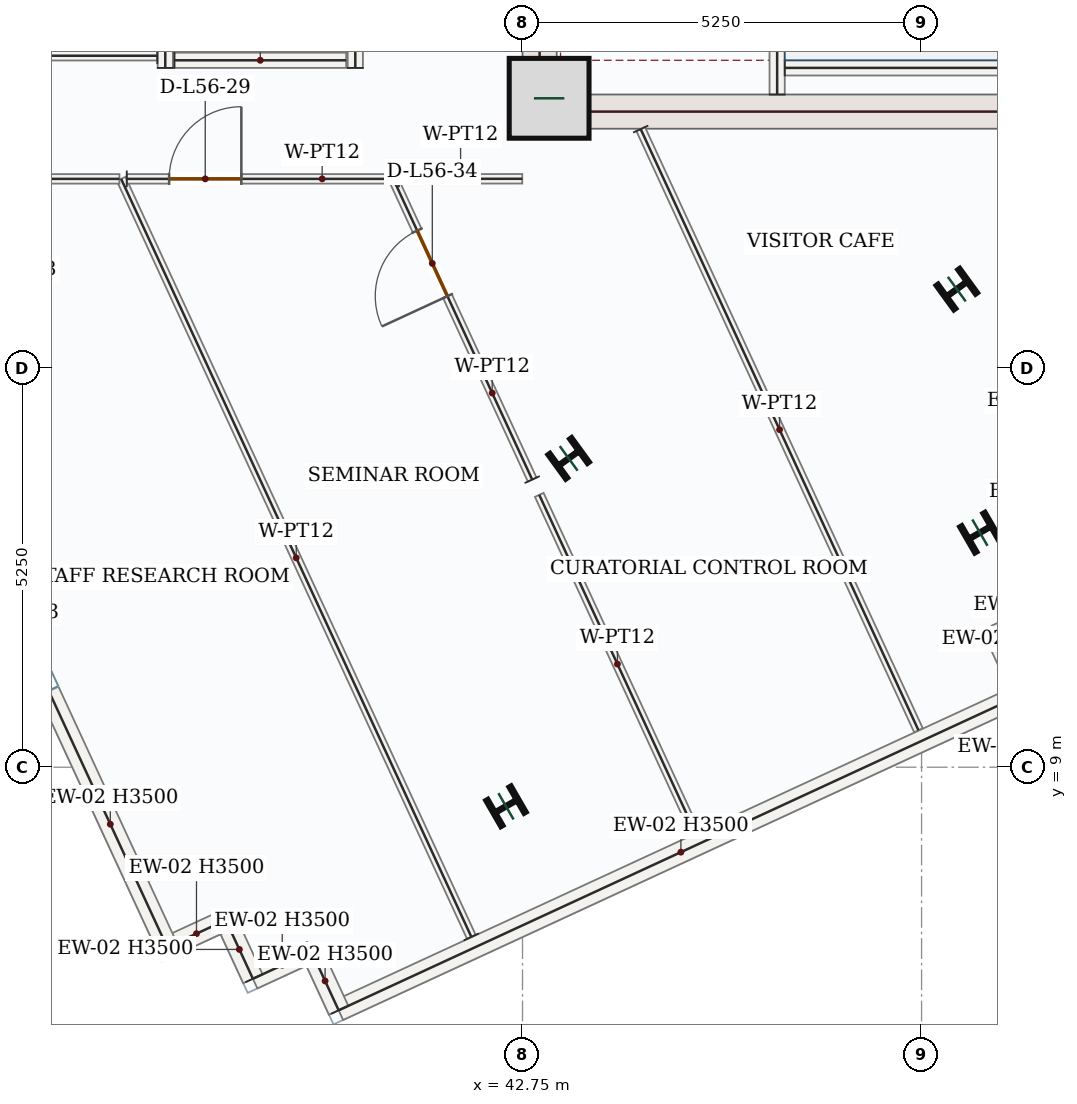
"""IFC4 building model, lengths in metres.
Left out: names, types, materials, properties, quantities, classifications, styles, units other than length and angle.
Written with IfcOpenShell. Run it as: python <this file> out.ifc"""

import sys

from ifc_helpers import new_model, si_unit, direction, frame, frame_2d, origin, origin_2d, place, context, subcontext, project, spatial, rectangle, i_section, extrude, source, transform, mapped, element, fill, save


model = new_model("IFC4")
c1 = context("Model", 3, precision=1e-05, world=origin(), true_north=direction((0.0, 1.0)))
c2 = subcontext(c1, "Body", "Model", "MODEL_VIEW")
j1 = project(units=[si_unit("LENGTHUNIT", "METRE"), si_unit("PLANEANGLEUNIT", "RADIAN")], contexts=[c1])
p1 = place(None, origin())
s1 = spatial("IfcSite", under=j1, at=p1, CompositionType="ELEMENT")
p2 = place(p1, origin())
s2 = spatial("IfcBuilding", under=s1, at=p2, CompositionType="ELEMENT")
p3 = place(p2, frame((0.0, 0.0, 239.1)))
s3 = spatial("IfcBuildingStorey", under=s2, at=p3, CompositionType="ELEMENT", Elevation=239.1)
p4 = place(p3, frame((42.975, 17.4, 0.0), z_axis=(0.0, 0.0, 1.0), x_axis=(0.0, 1.0, 0.0)))
e1 = element("IfcWall", 1, at=p4, inside=s3, PredefinedType="SHEAR", context=c2, shape_type="SweptSolid", body=[
    extrude(rectangle(XDim=8.55, YDim=0.45, at=frame_2d((4.275, 0.0))), origin(), (0.0, 0.0, 1.0), 3.5),
])
p5 = place(p4, frame((6.65, 0.0, 0.0)))
e2 = element("IfcOpeningElement", 2, at=p5, cuts=e1, PredefinedType="OPENING", context=c2, shape_type="SweptSolid", body=[
    extrude(rectangle(XDim=1.1, YDim=2.2, at=frame_2d((0.55, 1.1))), frame((0.0, 0.235, 0.0), z_axis=(0.0, -1.0, 0.0), x_axis=(1.0, 0.0, 0.0)), (0.0, 0.0, 1.0), 0.47),
])
p6 = place(p4, frame((1.75, 0.0, 0.0)))
e3 = element("IfcOpeningElement", 3, at=p6, cuts=e1, PredefinedType="OPENING", context=c2, shape_type="SweptSolid", body=[
    extrude(rectangle(XDim=1.3, YDim=2.2, at=frame_2d((0.65, 1.1))), frame((0.0, 0.235, 0.0), z_axis=(0.0, -1.0, 0.0), x_axis=(1.0, 0.0, 0.0)), (0.0, 0.0, 1.0), 0.47),
])
p7 = place(p4, frame((4.3, 0.0, 0.0)))
e4 = element("IfcOpeningElement", 4, at=p7, cuts=e1, PredefinedType="OPENING", context=c2, shape_type="SweptSolid", body=[
    extrude(rectangle(XDim=0.88, YDim=2.1, at=frame_2d((0.44, 1.05))), frame((0.0, 0.235, 0.0), z_axis=(0.0, -1.0, 0.0), x_axis=(1.0, 0.0, 0.0)), (0.0, 0.0, 1.0), 0.47),
])
m1 = source(origin(), c2, "Body", "SweptSolid", [
    extrude(rectangle(XDim=7.1, YDim=0.45, at=frame_2d((3.55, 0.0))), origin(), (0.0, 0.0, 1.0), 3.5),
])
p8 = place(p3, frame((43.2, 17.625, 0.0), z_axis=(0.0, 0.0, 1.0), x_axis=(1.0, 0.0, 0.0)))
e5 = element("IfcWall", 5, at=p8, inside=s3, PredefinedType="SHEAR", context=c2, shape_type="MappedRepresentation", body=[
    mapped(m1, transform((0.0, 0.0, 0.0), x_axis=(1.0, 0.0, 0.0), y_axis=(0.0, 1.0, 0.0), z_axis=(0.0, 0.0, 1.0), scale=1.0)),
])
m2 = source(origin(), c2, "Body", "SweptSolid", [
    extrude(rectangle(XDim=1.05, YDim=1.05, at=origin_2d()), origin(), (0.0, 0.0, 1.0), 3.75),
])
p9 = place(p3, frame((43.1, 17.8, 0.0), z_axis=(0.0, 0.0, 1.0), x_axis=(1.0, 0.0, 0.0)))
e6 = element("IfcColumn", 6, at=p9, inside=s3, PredefinedType="COLUMN", context=c2, shape_type="MappedRepresentation", body=[
    mapped(m2, transform((0.0, 0.0, 0.0), x_axis=(1.0, 0.0, 0.0), y_axis=(0.0, 1.0, 0.0), z_axis=(0.0, 0.0, 1.0), scale=1.0)),
])
m3 = source(origin(), c2, "Body", "SweptSolid", [
    extrude(i_section(OverallWidth=0.399, OverallDepth=0.386, WebThickness=0.021, FlangeThickness=0.033, FilletRadius=0.018, at=origin_2d()), origin(), (0.0, 0.0, 1.0), 3.75),
])
for number, where, z_axis, x_axis in (
    (7, (43.357, 13.063, 0.0), (0.0, 0.0, 1.0), (-0.588, 0.809, 0.0)),
    (8, (48.464, 15.289, 0.0), (0.0, 0.0, 1.0), (-0.588, 0.809, 0.0)),
    (9, (42.532, 8.486, 0.0), (0.0, 0.0, 1.0), (-0.5, 0.866, 0.0)),
    (10, (48.768, 12.086, 0.0), (0.0, 0.0, 1.0), (-0.5, 0.866, 0.0)),
):
    element("IfcColumn", number, at=place(p3, frame(where, z_axis=z_axis, x_axis=x_axis)), inside=s3, PredefinedType="COLUMN", context=c2, shape_type="MappedRepresentation", body=[
        mapped(m3, transform((0.0, 0.0, 0.0), x_axis=(1.0, 0.0, 0.0), y_axis=(0.0, 1.0, 0.0), z_axis=(0.0, 0.0, 1.0), scale=1.0)),
    ])
m4 = source(origin(), c2, "Body", "SweptSolid", [
    extrude(rectangle(XDim=0.85, YDim=0.28, at=frame_2d((0.425, 0.0))), origin(), (0.0, 0.0, 1.0), 3.5),
])
p10 = place(p3, frame((49.751, 11.091, 0.0), z_axis=(0.0, 0.0, 1.0), x_axis=(-0.907791150023, -0.419422493365, 0.0)))
e11 = element("IfcWall", 11, at=p10, inside=s3, PredefinedType="SOLIDWALL", context=c2, shape_type="MappedRepresentation", body=[
    mapped(m4, transform((0.0, 0.0, 0.0), x_axis=(1.0, 0.0, 0.0), y_axis=(0.0, 1.0, 0.0), z_axis=(0.0, 0.0, 1.0), scale=1.0)),
])
m5 = source(origin(), c2, "Body", "SweptSolid", [
    extrude(rectangle(XDim=0.85, YDim=0.28, at=frame_2d((0.425, 0.0))), origin(), (0.0, 0.0, 1.0), 3.5),
])
p11 = place(p3, frame((48.98, 10.734, 0.0), z_axis=(0.0, 0.0, 1.0), x_axis=(0.419313139191, -0.907841666427, 0.0)))
e12 = element("IfcWall", 12, at=p11, inside=s3, PredefinedType="SOLIDWALL", context=c2, shape_type="MappedRepresentation", body=[
    mapped(m5, transform((0.0, 0.0, 0.0), x_axis=(1.0, 0.0, 0.0), y_axis=(0.0, 1.0, 0.0), z_axis=(0.0, 0.0, 1.0), scale=1.0)),
])
m6 = source(origin(), c2, "Body", "SweptSolid", [
    extrude(rectangle(XDim=9.92, YDim=0.28, at=frame_2d((4.96, 0.0))), origin(), (0.0, 0.0, 1.0), 3.5),
])
p12 = place(p3, frame((49.336, 9.963, 0.0), z_axis=(0.0, 0.0, 1.0), x_axis=(-0.907779940536, -0.419446754143, 0.0)))
e13 = element("IfcWall", 13, at=p12, inside=s3, PredefinedType="SOLIDWALL", context=c2, shape_type="MappedRepresentation", body=[
    mapped(m6, transform((0.0, 0.0, 0.0), x_axis=(1.0, 0.0, 0.0), y_axis=(0.0, 1.0, 0.0), z_axis=(0.0, 0.0, 1.0), scale=1.0)),
])
p13 = place(p3, frame((40.331, 5.802, 0.0), z_axis=(0.0, 0.0, 1.0), x_axis=(-0.419422493365, 0.907791150023, 0.0)))
e14 = element("IfcWall", 14, at=p13, inside=s3, PredefinedType="SOLIDWALL", context=c2, shape_type="MappedRepresentation", body=[
    mapped(m4, transform((0.0, 0.0, 0.0), x_axis=(1.0, 0.0, 0.0), y_axis=(0.0, 1.0, 0.0), z_axis=(0.0, 0.0, 1.0), scale=1.0)),
])
p14 = place(p3, frame((39.975, 6.573, 0.0), z_axis=(0.0, 0.0, 1.0), x_axis=(-0.907841666427, -0.419313139191, 0.0)))
e15 = element("IfcWall", 15, at=p14, inside=s3, PredefinedType="SOLIDWALL", context=c2, shape_type="MappedRepresentation", body=[
    mapped(m5, transform((0.0, 0.0, 0.0), x_axis=(1.0, 0.0, 0.0), y_axis=(0.0, 1.0, 0.0), z_axis=(0.0, 0.0, 1.0), scale=1.0)),
])
p15 = place(p3, frame((39.203, 6.217, 0.0), z_axis=(0.0, 0.0, 1.0), x_axis=(-0.419422493365, 0.907791150023, 0.0)))
e16 = element("IfcWall", 16, at=p15, inside=s3, PredefinedType="SOLIDWALL", context=c2, shape_type="MappedRepresentation", body=[
    mapped(m4, transform((0.0, 0.0, 0.0), x_axis=(1.0, 0.0, 0.0), y_axis=(0.0, 1.0, 0.0), z_axis=(0.0, 0.0, 1.0), scale=1.0)),
])
p16 = place(p3, frame((38.846, 6.988, 0.0), z_axis=(0.0, 0.0, 1.0), x_axis=(-0.907841666427, -0.419313139191, 0.0)))
e17 = element("IfcWall", 17, at=p16, inside=s3, PredefinedType="SOLIDWALL", context=c2, shape_type="MappedRepresentation", body=[
    mapped(m5, transform((0.0, 0.0, 0.0), x_axis=(1.0, 0.0, 0.0), y_axis=(0.0, 1.0, 0.0), z_axis=(0.0, 0.0, 1.0), scale=1.0)),
])
p17 = place(p3, frame((38.075, 6.632, 0.0), z_axis=(0.0, 0.0, 1.0), x_axis=(-0.419437747849, 0.90778410191, 0.0)))
e18 = element("IfcWall", 18, at=p17, inside=s3, PredefinedType="SOLIDWALL", context=c2, shape_type="SweptSolid", body=[
    extrude(rectangle(XDim=8.932, YDim=0.28, at=frame_2d((4.466, 0.0))), origin(), (0.0, 0.0, 1.0), 3.5),
])
p18 = place(p17, frame((3.716, 0.0, 0.85)))
e19 = element("IfcOpeningElement", 19, at=p18, cuts=e18, PredefinedType="OPENING", context=c2, shape_type="SweptSolid", body=[
    extrude(rectangle(XDim=1.5, YDim=1.5, at=frame_2d((0.75, 0.75))), frame((0.0, 0.15, 0.0), z_axis=(0.0, -1.0, 0.0), x_axis=(1.0, 0.0, 0.0)), (0.0, 0.0, 1.0), 0.3),
])
p19 = place(p3, frame((46.1, 17.85, 0.0), z_axis=(0.0, 0.0, 1.0), x_axis=(0.0, 1.0, 0.0)))
e20 = element("IfcWall", 20, at=p19, inside=s3, PredefinedType="SOLIDWALL", context=c2, shape_type="SweptSolid", body=[
    extrude(rectangle(XDim=8.0, YDim=0.2, at=frame_2d((4.0, 0.0))), origin(), (0.0, 0.0, 1.0), 3.5),
])
p20 = place(p19, frame((6.3, 0.0, 0.0)))
e21 = element("IfcOpeningElement", 21, at=p20, cuts=e20, PredefinedType="OPENING", context=c2, shape_type="SweptSolid", body=[
    extrude(rectangle(XDim=1.05, YDim=2.15, at=frame_2d((0.525, 1.075))), frame((0.0, 0.11, 0.0), z_axis=(0.0, -1.0, 0.0), x_axis=(1.0, 0.0, 0.0)), (0.0, 0.0, 1.0), 0.22),
])
m7 = source(origin(), c2, "Body", "SweptSolid", [
    extrude(rectangle(XDim=3.25, YDim=0.2, at=frame_2d((1.625, 0.0))), origin(), (0.0, 0.0, 1.0), 3.5),
])
p21 = place(p3, frame((46.2, 18.2, 0.0), z_axis=(0.0, 0.0, 1.0), x_axis=(1.0, 0.0, 0.0)))
e22 = element("IfcWall", 22, at=p21, inside=s3, PredefinedType="SOLIDWALL", context=c2, shape_type="MappedRepresentation", body=[
    mapped(m7, transform((0.0, 0.0, 0.0), x_axis=(1.0, 0.0, 0.0), y_axis=(0.0, 1.0, 0.0), z_axis=(0.0, 0.0, 1.0), scale=1.0)),
])
m8 = source(origin(), c2, "Body", "SweptSolid", [
    extrude(rectangle(XDim=2.35, YDim=0.2, at=frame_2d((1.175, 0.0))), origin(), (0.0, 0.0, 1.0), 3.5),
])
for number, where, z_axis, x_axis in (
    (23, (38.05, 18.2, 0.0), (0.0, 0.0, 1.0), (0.0, 1.0, 0.0)),
    (24, (40.55, 18.2, 0.0), (0.0, 0.0, 1.0), (0.0, 1.0, 0.0)),
):
    element("IfcWall", number, at=place(p3, frame(where, z_axis=z_axis, x_axis=x_axis)), inside=s3, PredefinedType="SOLIDWALL", context=c2, shape_type="MappedRepresentation", body=[
        mapped(m8, transform((0.0, 0.0, 0.0), x_axis=(1.0, 0.0, 0.0), y_axis=(0.0, 1.0, 0.0), z_axis=(0.0, 0.0, 1.0), scale=1.0)),
    ])
m9 = source(origin(), c2, "Body", "SweptSolid", [
    extrude(rectangle(XDim=2.26, YDim=0.2, at=frame_2d((1.13, 0.0))), origin(), (0.0, 0.0, 1.0), 3.5),
])
p22 = place(p3, frame((38.17, 18.3, 0.0), z_axis=(0.0, 0.0, 1.0), x_axis=(1.0, 0.0, 0.0)))
e25 = element("IfcWall", 25, at=p22, inside=s3, PredefinedType="SOLIDWALL", context=c2, shape_type="MappedRepresentation", body=[
    mapped(m9, transform((0.0, 0.0, 0.0), x_axis=(1.0, 0.0, 0.0), y_axis=(0.0, 1.0, 0.0), z_axis=(0.0, 0.0, 1.0), scale=1.0)),
])
p23 = place(p3, frame((37.945, 18.36, 0.0), z_axis=(0.0, 0.0, 1.0), x_axis=(-1.0, 0.0, 0.0)))
e26 = element("IfcWall", 26, at=p23, inside=s3, PredefinedType="PARTITIONING", context=c2, shape_type="SweptSolid", body=[
    extrude(rectangle(XDim=3.89, YDim=0.125, at=frame_2d((1.945, 0.0))), origin(), (0.0, 0.0, 1.0), 3.5),
])
p24 = place(p23, frame((1.47, 0.0, 0.0)))
e27 = element("IfcOpeningElement", 27, at=p24, cuts=e26, PredefinedType="OPENING", context=c2, shape_type="SweptSolid", body=[
    extrude(rectangle(XDim=0.95, YDim=2.15, at=frame_2d((0.475, 1.075))), frame((0.0, 0.073, 0.0), z_axis=(0.0, -1.0, 0.0), x_axis=(1.0, 0.0, 0.0)), (0.0, 0.0, 1.0), 0.145),
])
m10 = source(origin(), c2, "Body", "SweptSolid", [
    extrude(rectangle(XDim=4.904, YDim=0.125, at=frame_2d((2.452, 0.0))), origin(), (0.0, 0.0, 1.0), 3.5),
])
p25 = place(p3, frame((45.027, 8.131, 0.0), z_axis=(0.0, 0.0, 1.0), x_axis=(-0.419459107568, 0.907774232438, 0.0)))
e28 = element("IfcWall", 28, at=p25, inside=s3, PredefinedType="PARTITIONING", context=c2, shape_type="MappedRepresentation", body=[
    mapped(m10, transform((0.0, 0.0, 0.0), x_axis=(1.0, 0.0, 0.0), y_axis=(0.0, 1.0, 0.0), z_axis=(0.0, 0.0, 1.0), scale=1.0)),
])
p26 = place(p3, frame((42.877, 12.784, 0.0), z_axis=(0.0, 0.0, 1.0), x_axis=(-0.419416941906, 0.907793714917, 0.0)))
e29 = element("IfcWall", 29, at=p26, inside=s3, PredefinedType="PARTITIONING", context=c2, shape_type="SweptSolid", body=[
    extrude(rectangle(XDim=4.358, YDim=0.125, at=frame_2d((2.179, 0.0))), origin(), (0.0, 0.0, 1.0), 3.5),
])
p27 = place(p26, frame((2.658, 0.0, 0.0)))
e30 = element("IfcOpeningElement", 30, at=p27, cuts=e29, PredefinedType="OPENING", context=c2, shape_type="SweptSolid", body=[
    extrude(rectangle(XDim=0.95, YDim=2.15, at=frame_2d((0.475, 1.075))), frame((0.0, 0.073, 0.0), z_axis=(0.0, -1.0, 0.0), x_axis=(1.0, 0.0, 0.0)), (0.0, 0.0, 1.0), 0.145),
])
m11 = source(origin(), c2, "Body", "SweptSolid", [
    extrude(rectangle(XDim=1.623, YDim=0.125, at=frame_2d((0.812, 0.0))), origin(), (0.0, 0.0, 1.0), 3.5),
])
p28 = place(p3, frame((41.124, 16.74, 0.0), z_axis=(0.0, 0.0, 1.0), x_axis=(0.999999717168, 0.000752105684, 0.0)))
e31 = element("IfcWall", 31, at=p28, inside=s3, PredefinedType="PARTITIONING", context=c2, shape_type="MappedRepresentation", body=[
    mapped(m11, transform((0.0, 0.0, 0.0), x_axis=(1.0, 0.0, 0.0), y_axis=(0.0, 1.0, 0.0), z_axis=(0.0, 0.0, 1.0), scale=1.0)),
])
m12 = source(origin(), c2, "Body", "SweptSolid", [
    extrude(rectangle(XDim=8.712, YDim=0.125, at=frame_2d((4.356, 0.0))), origin(), (0.0, 0.0, 1.0), 3.5),
])
p29 = place(p3, frame((44.305, 17.395, 0.0), z_axis=(0.0, 0.0, 1.0), x_axis=(0.419438424399, -0.907783789312, 0.0)))
e32 = element("IfcWall", 32, at=p29, inside=s3, PredefinedType="PARTITIONING", context=c2, shape_type="MappedRepresentation", body=[
    mapped(m12, transform((0.0, 0.0, 0.0), x_axis=(1.0, 0.0, 0.0), y_axis=(0.0, 1.0, 0.0), z_axis=(0.0, 0.0, 1.0), scale=1.0)),
])
m13 = source(origin(), c2, "Body", "SweptSolid", [
    extrude(rectangle(XDim=10.985, YDim=0.125, at=frame_2d((5.492, 0.0))), origin(), (0.0, 0.0, 1.0), 3.5),
])
p30 = place(p3, frame((42.077, 6.768, 0.0), z_axis=(0.0, 0.0, 1.0), x_axis=(-0.41945135704, 0.907777813717, 0.0)))
e33 = element("IfcWall", 33, at=p30, inside=s3, PredefinedType="PARTITIONING", context=c2, shape_type="MappedRepresentation", body=[
    mapped(m13, transform((0.0, 0.0, 0.0), x_axis=(1.0, 0.0, 0.0), y_axis=(0.0, 1.0, 0.0), z_axis=(0.0, 0.0, 1.0), scale=1.0)),
])
p31 = place(p3, frame((37.543, 16.74, 0.0), z_axis=(0.0, 0.0, 1.0), x_axis=(1.0, 0.0, 0.0)))
e34 = element("IfcWall", 34, at=p31, inside=s3, PredefinedType="PARTITIONING", context=c2, shape_type="SweptSolid", body=[
    extrude(rectangle(XDim=3.484, YDim=0.125, at=frame_2d((1.742, 0.0))), origin(), (0.0, 0.0, 1.0), 3.5),
])
p32 = place(p31, frame((0.557, 0.0, 0.0)))
e35 = element("IfcOpeningElement", 35, at=p32, cuts=e34, PredefinedType="OPENING", context=c2, shape_type="SweptSolid", body=[
    extrude(rectangle(XDim=0.95, YDim=2.15, at=frame_2d((0.475, 1.075))), frame((0.0, 0.073, 0.0), z_axis=(0.0, -1.0, 0.0), x_axis=(1.0, 0.0, 0.0)), (0.0, 0.0, 1.0), 0.145),
])
p33 = place(p3, frame((32.211, 16.74, 0.0), z_axis=(0.0, 0.0, 1.0), x_axis=(1.0, 0.0, 0.0)))
e36 = element("IfcWall", 36, at=p33, inside=s3, PredefinedType="PARTITIONING", context=c2, shape_type="SweptSolid", body=[
    extrude(rectangle(XDim=5.236, YDim=0.125, at=frame_2d((2.618, 0.0))), origin(), (0.0, 0.0, 1.0), 3.5),
])
p34 = place(p33, frame((3.343, 0.0, 0.0)))
e37 = element("IfcOpeningElement", 37, at=p34, cuts=e36, PredefinedType="OPENING", context=c2, shape_type="SweptSolid", body=[
    extrude(rectangle(XDim=0.95, YDim=2.15, at=frame_2d((0.475, 1.075))), frame((0.0, 0.073, 0.0), z_axis=(0.0, -1.0, 0.0), x_axis=(1.0, 0.0, 0.0)), (0.0, 0.0, 1.0), 0.145),
])
m14 = source(origin(), c2, "Body", "SweptSolid", [
    extrude(rectangle(XDim=0.95, YDim=2.15, at=frame_2d((0.475, 1.075))), frame((0.0, 0.025, 0.0), z_axis=(0.0, -1.0, 0.0), x_axis=(1.0, 0.0, 0.0)), (0.0, 0.0, 1.0), 0.05),
])
p35 = place(p32, origin())
e38 = element("IfcDoor", 38, at=p35, inside=s3, OperationType="SINGLE_SWING_RIGHT", PredefinedType="DOOR", context=c2, shape_type="MappedRepresentation", body=[
    mapped(m14, transform((0.0, 0.0, 0.0), x_axis=(1.0, 0.0, 0.0), y_axis=(0.0, 1.0, 0.0), z_axis=(0.0, 0.0, 1.0), scale=1.0)),
])
fill(e35, e38)
p36 = place(p27, origin())
e39 = element("IfcDoor", 39, at=p36, inside=s3, OperationType="SINGLE_SWING_LEFT", PredefinedType="DOOR", context=c2, shape_type="MappedRepresentation", body=[
    mapped(m14, transform((0.0, 0.0, 0.0), x_axis=(1.0, 0.0, 0.0), y_axis=(0.0, 1.0, 0.0), z_axis=(0.0, 0.0, 1.0), scale=1.0)),
])
fill(e30, e39)
save(model, sys.argv[1])
